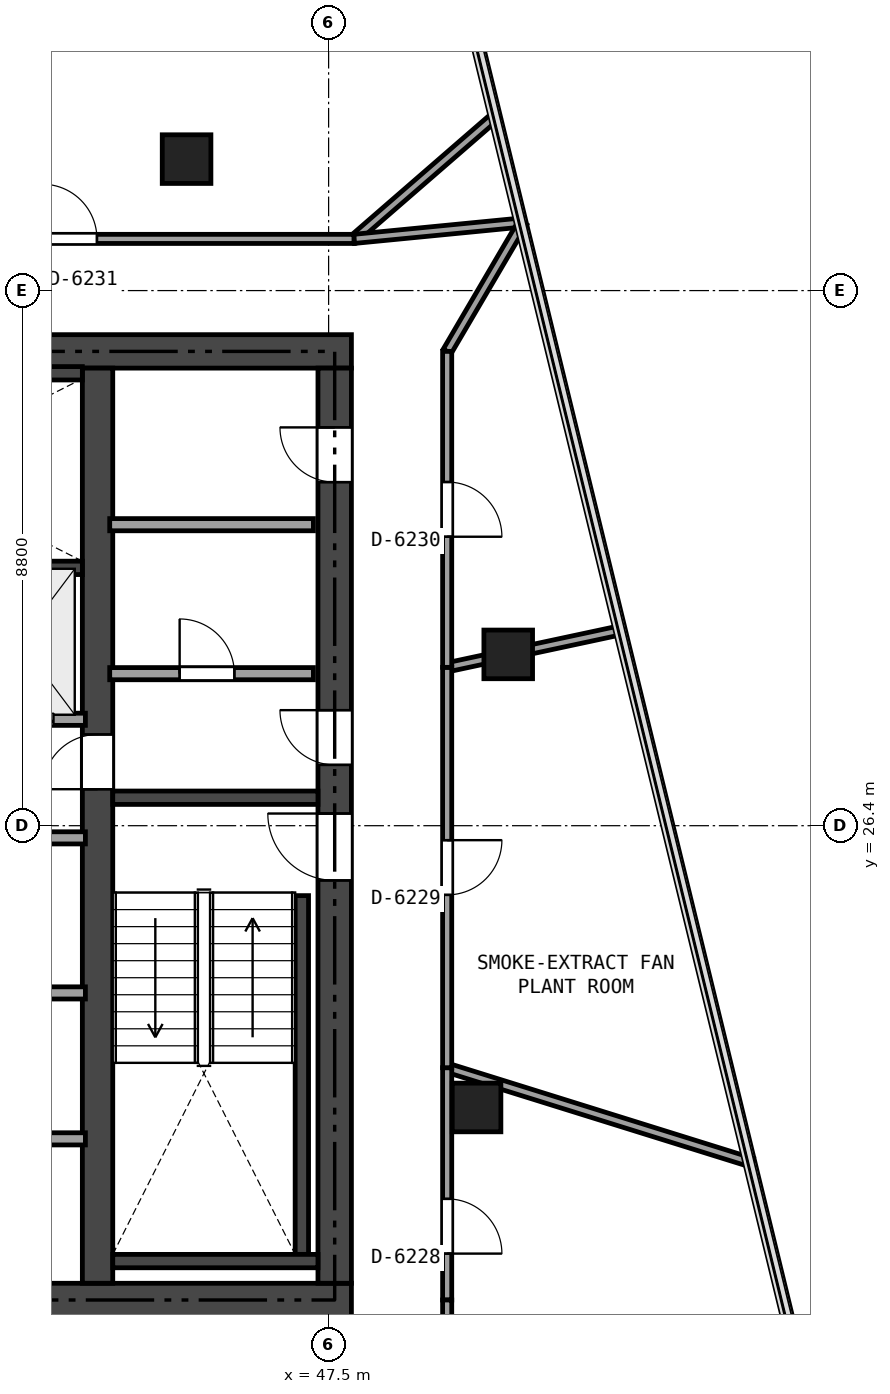
"""IFC4 building model, lengths in metres.
Left out: names, types, materials, properties, quantities, classifications, styles, units other than length and angle.
Written with IfcOpenShell. Run it as: python <this file> out.ifc"""

import sys

from ifc_helpers import new_model, si_unit, direction, frame, frame_2d, origin, origin_2d, place, context, subcontext, project, spatial, rectangle, extrude, element, fill, save


model = new_model("IFC4")
c1 = context("Model", 3, precision=1e-05, world=origin(), true_north=direction((0.0, 1.0)))
c2 = subcontext(c1, "Body", "Model", "MODEL_VIEW")
j1 = project(units=[si_unit("LENGTHUNIT", "METRE"), si_unit("PLANEANGLEUNIT", "RADIAN")], contexts=[c1])
p1 = place(None, origin())
s1 = spatial("IfcSite", under=j1, at=p1, CompositionType="ELEMENT")
p2 = place(p1, origin())
s2 = spatial("IfcBuilding", under=s1, at=p2, CompositionType="ELEMENT")
p3 = place(p2, frame((0.0, 0.0, 231.9)))
s3 = spatial("IfcBuildingStorey", under=s2, at=p3, CompositionType="ELEMENT", Elevation=231.9)
p4 = place(p3, frame((26.525, 18.6, 0.0), z_axis=(0.0, 0.0, 1.0), x_axis=(1.0, 0.0, 0.0)))
e1 = element("IfcWall", 1, at=p4, inside=s3, PredefinedType="SHEAR", context=c2, shape_type="SweptSolid", body=[
    extrude(rectangle(XDim=21.35, YDim=0.55, at=frame_2d((10.675, 0.0))), origin(), (0.0, 0.0, 1.0), 3.18),
])
p5 = place(p4, frame((12.4, 0.0, 0.0)))
e2 = element("IfcOpeningElement", 2, at=p5, cuts=e1, PredefinedType="OPENING", context=c2, shape_type="SweptSolid", body=[
    extrude(rectangle(XDim=1.15, YDim=2.15, at=frame_2d((0.575, 1.075))), frame((0.0, 0.285, 0.0), z_axis=(0.0, -1.0, 0.0), x_axis=(1.0, 0.0, 0.0)), (0.0, 0.0, 1.0), 0.57),
])
p6 = place(p4, frame((5.225, 0.0, 0.0)))
e3 = element("IfcOpeningElement", 3, at=p6, cuts=e1, PredefinedType="OPENING", context=c2, shape_type="SweptSolid", body=[
    extrude(rectangle(XDim=0.9, YDim=2.1, at=frame_2d((0.45, 1.05))), frame((0.0, 0.285, 0.0), z_axis=(0.0, -1.0, 0.0), x_axis=(1.0, 0.0, 0.0)), (0.0, 0.0, 1.0), 0.57),
])
p7 = place(p3, frame((26.525, 34.2, 0.0), z_axis=(0.0, 0.0, 1.0), x_axis=(1.0, 0.0, 0.0)))
e4 = element("IfcWall", 4, at=p7, inside=s3, PredefinedType="SHEAR", context=c2, shape_type="SweptSolid", body=[
    extrude(rectangle(XDim=21.35, YDim=0.55, at=frame_2d((10.675, 0.0))), origin(), (0.0, 0.0, 1.0), 3.18),
])
p8 = place(p7, frame((9.675, 0.0, 0.0)))
e5 = element("IfcOpeningElement", 5, at=p8, cuts=e4, PredefinedType="OPENING", context=c2, shape_type="SweptSolid", body=[
    extrude(rectangle(XDim=1.1, YDim=2.15, at=frame_2d((0.55, 1.075))), frame((0.0, 0.285, 0.0), z_axis=(0.0, -1.0, 0.0), x_axis=(1.0, 0.0, 0.0)), (0.0, 0.0, 1.0), 0.57),
])
p9 = place(p7, frame((1.925, 0.0, 0.0)))
e6 = element("IfcOpeningElement", 6, at=p9, cuts=e4, PredefinedType="OPENING", context=c2, shape_type="SweptSolid", body=[
    extrude(rectangle(XDim=0.9, YDim=2.1, at=frame_2d((0.45, 1.05))), frame((0.0, 0.285, 0.0), z_axis=(0.0, -1.0, 0.0), x_axis=(1.0, 0.0, 0.0)), (0.0, 0.0, 1.0), 0.57),
])
p10 = place(p7, frame((6.225, 0.0, 0.0)))
e7 = element("IfcOpeningElement", 7, at=p10, cuts=e4, PredefinedType="OPENING", context=c2, shape_type="SweptSolid", body=[
    extrude(rectangle(XDim=0.9, YDim=2.1, at=frame_2d((0.45, 1.05))), frame((0.0, 0.285, 0.0), z_axis=(0.0, -1.0, 0.0), x_axis=(1.0, 0.0, 0.0)), (0.0, 0.0, 1.0), 0.57),
])
p11 = place(p3, frame((47.6, 18.875, 0.0), z_axis=(0.0, 0.0, 1.0), x_axis=(0.0, 1.0, 0.0)))
e8 = element("IfcWall", 8, at=p11, inside=s3, PredefinedType="SHEAR", context=c2, shape_type="SweptSolid", body=[
    extrude(rectangle(XDim=15.05, YDim=0.55, at=frame_2d((7.525, 0.0))), origin(), (0.0, 0.0, 1.0), 3.18),
])
p12 = place(p11, frame((6.625, 0.0, 0.0)))
e9 = element("IfcOpeningElement", 9, at=p12, cuts=e8, PredefinedType="OPENING", context=c2, shape_type="SweptSolid", body=[
    extrude(rectangle(XDim=1.1, YDim=2.15, at=frame_2d((0.55, 1.075))), frame((0.0, 0.285, 0.0), z_axis=(0.0, -1.0, 0.0), x_axis=(1.0, 0.0, 0.0)), (0.0, 0.0, 1.0), 0.57),
])
p13 = place(p11, frame((8.525, 0.0, 0.0)))
e10 = element("IfcOpeningElement", 10, at=p13, cuts=e8, PredefinedType="OPENING", context=c2, shape_type="SweptSolid", body=[
    extrude(rectangle(XDim=0.9, YDim=2.1, at=frame_2d((0.45, 1.05))), frame((0.0, 0.285, 0.0), z_axis=(0.0, -1.0, 0.0), x_axis=(1.0, 0.0, 0.0)), (0.0, 0.0, 1.0), 0.57),
])
p14 = place(p11, frame((13.175, 0.0, 0.0)))
e11 = element("IfcOpeningElement", 11, at=p14, cuts=e8, PredefinedType="OPENING", context=c2, shape_type="SweptSolid", body=[
    extrude(rectangle(XDim=0.9, YDim=2.1, at=frame_2d((0.45, 1.05))), frame((0.0, 0.285, 0.0), z_axis=(0.0, -1.0, 0.0), x_axis=(1.0, 0.0, 0.0)), (0.0, 0.0, 1.0), 0.57),
])
p15 = place(p3, frame((43.7, 18.875, 0.0), z_axis=(0.0, 0.0, 1.0), x_axis=(0.0, 1.0, 0.0)))
e12 = element("IfcWall", 12, at=p15, inside=s3, PredefinedType="SHEAR", context=c2, shape_type="SweptSolid", body=[
    extrude(rectangle(XDim=15.05, YDim=0.5, at=frame_2d((7.525, 0.0))), origin(), (0.0, 0.0, 1.0), 3.18),
])
p16 = place(p15, frame((8.125, 0.0, 0.0)))
e13 = element("IfcOpeningElement", 13, at=p16, cuts=e12, PredefinedType="OPENING", context=c2, shape_type="SweptSolid", body=[
    extrude(rectangle(XDim=0.9, YDim=2.1, at=frame_2d((0.45, 1.05))), frame((0.0, 0.26, 0.0), z_axis=(0.0, -1.0, 0.0), x_axis=(1.0, 0.0, 0.0)), (0.0, 0.0, 1.0), 0.52),
])
p17 = place(p3, frame((43.95, 26.86, 0.0), z_axis=(0.0, 0.0, 1.0), x_axis=(1.0, 0.0, 0.0)))
e14 = element("IfcWall", 14, at=p17, inside=s3, PredefinedType="SHEAR", context=c2, shape_type="SweptSolid", body=[
    extrude(rectangle(XDim=3.375, YDim=0.22, at=frame_2d((1.688, 0.0))), origin(), (0.0, 0.0, 1.0), 3.18),
])
p18 = place(p3, frame((47.06, 19.35, 0.0), z_axis=(0.0, 0.0, 1.0), x_axis=(0.0, 1.0, 0.0)))
e15 = element("IfcWall", 15, at=p18, inside=s3, PredefinedType="SHEAR", context=c2, shape_type="SweptSolid", body=[
    extrude(rectangle(XDim=5.9, YDim=0.22, at=frame_2d((2.95, 0.0))), origin(), (0.0, 0.0, 1.0), 3.18),
])
p19 = place(p3, frame((43.95, 19.24, 0.0), z_axis=(0.0, 0.0, 1.0), x_axis=(1.0, 0.0, 0.0)))
e16 = element("IfcWall", 16, at=p19, inside=s3, PredefinedType="SHEAR", context=c2, shape_type="SweptSolid", body=[
    extrude(rectangle(XDim=3.375, YDim=0.22, at=frame_2d((1.688, 0.0))), origin(), (0.0, 0.0, 1.0), 3.18),
])
p20 = place(p3, frame((35.84, 30.64, 0.0), z_axis=(0.0, 0.0, 1.0), x_axis=(1.0, 0.0, 0.0)))
e17 = element("IfcWall", 17, at=p20, inside=s3, PredefinedType="SHEAR", context=c2, shape_type="SweptSolid", body=[
    extrude(rectangle(XDim=7.61, YDim=0.22, at=frame_2d((3.805, 0.0))), origin(), (0.0, 0.0, 1.0), 3.18),
])
p21 = place(p3, frame((37.55, 33.84, 0.0), z_axis=(0.0, 0.0, 1.0), x_axis=(1.0, 0.0, 0.0)))
e18 = element("IfcWall", 18, at=p21, inside=s3, PredefinedType="SHEAR", context=c2, shape_type="SweptSolid", body=[
    extrude(rectangle(XDim=5.9, YDim=0.22, at=frame_2d((2.95, 0.0))), origin(), (0.0, 0.0, 1.0), 3.18),
])
for number, where, z_axis, x_axis in (
    (19, (50.454, 29.217, 0.0), (0.0, 0.0, 1.0), (1.0, 0.0, 0.0)),
    (20, (45.164, 37.362, 0.0), (0.0, 0.0, 1.0), (1.0, 0.0, 0.0)),
    (21, (49.933, 21.766, 0.0), (0.0, 0.0, 1.0), (1.0, 0.0, 0.0)),
):
    element("IfcColumn", number, at=place(p3, frame(where, z_axis=z_axis, x_axis=x_axis)), inside=s3, PredefinedType="COLUMN", context=c2, shape_type="SweptSolid", body=[
        extrude(rectangle(XDim=0.8, YDim=0.8, at=origin_2d()), origin(), (0.0, 0.0, 1.0), 3.18),
    ])
p22 = place(p3, frame((43.9, 28.9, 0.0), z_axis=(0.0, 0.0, 1.0), x_axis=(1.0, 0.0, 0.0)))
e22 = element("IfcWall", 22, at=p22, inside=s3, PredefinedType="SOLIDWALL", context=c2, shape_type="SweptSolid", body=[
    extrude(rectangle(XDim=3.35, YDim=0.2, at=frame_2d((1.675, 0.0))), origin(), (0.0, 0.0, 1.0), 3.18),
])
p23 = place(p22, frame((1.15, 0.0, 0.0)))
e23 = element("IfcOpeningElement", 23, at=p23, cuts=e22, PredefinedType="OPENING", context=c2, shape_type="SweptSolid", body=[
    extrude(rectangle(XDim=0.9, YDim=2.1, at=frame_2d((0.45, 1.05))), frame((0.0, 0.11, 0.0), z_axis=(0.0, -1.0, 0.0), x_axis=(1.0, 0.0, 0.0)), (0.0, 0.0, 1.0), 0.22),
])
p24 = place(p3, frame((43.9, 31.35, 0.0), z_axis=(0.0, 0.0, 1.0), x_axis=(1.0, 0.0, 0.0)))
e24 = element("IfcWall", 24, at=p24, inside=s3, PredefinedType="SOLIDWALL", context=c2, shape_type="SweptSolid", body=[
    extrude(rectangle(XDim=3.35, YDim=0.2, at=frame_2d((1.675, 0.0))), origin(), (0.0, 0.0, 1.0), 2.809),
])
p25 = place(p3, frame((35.62, 28.15, 0.0), z_axis=(0.0, 0.0, 1.0), x_axis=(1.0, 0.0, 0.0)))
e25 = element("IfcWall", 25, at=p25, inside=s3, PredefinedType="SOLIDWALL", context=c2, shape_type="SweptSolid", body=[
    extrude(rectangle(XDim=7.88, YDim=0.2, at=frame_2d((3.94, 0.0))), origin(), (0.0, 0.0, 1.0), 3.18),
])
p26 = place(p25, frame((0.405, 0.0, 0.0)))
e26 = element("IfcOpeningElement", 26, at=p26, cuts=e25, PredefinedType="OPENING", context=c2, shape_type="SweptSolid", body=[
    extrude(rectangle(XDim=1.1, YDim=2.15, at=frame_2d((0.55, 1.075))), frame((0.0, 0.11, 0.0), z_axis=(0.0, -1.0, 0.0), x_axis=(1.0, 0.0, 0.0)), (0.0, 0.0, 1.0), 0.22),
])
p27 = place(p25, frame((2.355, 0.0, 0.0)))
e27 = element("IfcOpeningElement", 27, at=p27, cuts=e25, PredefinedType="OPENING", context=c2, shape_type="SweptSolid", body=[
    extrude(rectangle(XDim=1.1, YDim=2.15, at=frame_2d((0.55, 1.075))), frame((0.0, 0.11, 0.0), z_axis=(0.0, -1.0, 0.0), x_axis=(1.0, 0.0, 0.0)), (0.0, 0.0, 1.0), 0.22),
])
p28 = place(p25, frame((4.305, 0.0, 0.0)))
e28 = element("IfcOpeningElement", 28, at=p28, cuts=e25, PredefinedType="OPENING", context=c2, shape_type="SweptSolid", body=[
    extrude(rectangle(XDim=1.1, YDim=2.15, at=frame_2d((0.55, 1.075))), frame((0.0, 0.11, 0.0), z_axis=(0.0, -1.0, 0.0), x_axis=(1.0, 0.0, 0.0)), (0.0, 0.0, 1.0), 0.22),
])
p29 = place(p25, frame((6.255, 0.0, 0.0)))
e29 = element("IfcOpeningElement", 29, at=p29, cuts=e25, PredefinedType="OPENING", context=c2, shape_type="SweptSolid", body=[
    extrude(rectangle(XDim=1.1, YDim=2.15, at=frame_2d((0.55, 1.075))), frame((0.0, 0.11, 0.0), z_axis=(0.0, -1.0, 0.0), x_axis=(1.0, 0.0, 0.0)), (0.0, 0.0, 1.0), 0.22),
])
p30 = place(p3, frame((35.62, 26.2, 0.0), z_axis=(0.0, 0.0, 1.0), x_axis=(1.0, 0.0, 0.0)))
e30 = element("IfcWall", 30, at=p30, inside=s3, PredefinedType="SOLIDWALL", context=c2, shape_type="SweptSolid", body=[
    extrude(rectangle(XDim=7.88, YDim=0.2, at=frame_2d((3.94, 0.0))), origin(), (0.0, 0.0, 1.0), 3.18),
])
p31 = place(p30, frame((1.13, 0.0, 0.0)))
e31 = element("IfcOpeningElement", 31, at=p31, cuts=e30, PredefinedType="OPENING", context=c2, shape_type="SweptSolid", body=[
    extrude(rectangle(XDim=0.9, YDim=2.1, at=frame_2d((0.45, 1.05))), frame((0.0, 0.11, 0.0), z_axis=(0.0, -1.0, 0.0), x_axis=(1.0, 0.0, 0.0)), (0.0, 0.0, 1.0), 0.22),
])
p32 = place(p30, frame((5.73, 0.0, 0.0)))
e32 = element("IfcOpeningElement", 32, at=p32, cuts=e30, PredefinedType="OPENING", context=c2, shape_type="SweptSolid", body=[
    extrude(rectangle(XDim=0.9, YDim=2.1, at=frame_2d((0.45, 1.05))), frame((0.0, 0.11, 0.0), z_axis=(0.0, -1.0, 0.0), x_axis=(1.0, 0.0, 0.0)), (0.0, 0.0, 1.0), 0.22),
])
p33 = place(p3, frame((35.62, 23.65, 0.0), z_axis=(0.0, 0.0, 1.0), x_axis=(1.0, 0.0, 0.0)))
e33 = element("IfcWall", 33, at=p33, inside=s3, PredefinedType="SOLIDWALL", context=c2, shape_type="SweptSolid", body=[
    extrude(rectangle(XDim=7.88, YDim=0.2, at=frame_2d((3.94, 0.0))), origin(), (0.0, 0.0, 1.0), 2.701),
])
p34 = place(p3, frame((35.62, 21.25, 0.0), z_axis=(0.0, 0.0, 1.0), x_axis=(1.0, 0.0, 0.0)))
e34 = element("IfcWall", 34, at=p34, inside=s3, PredefinedType="SOLIDWALL", context=c2, shape_type="SweptSolid", body=[
    extrude(rectangle(XDim=7.88, YDim=0.2, at=frame_2d((3.94, 0.0))), origin(), (0.0, 0.0, 1.0), 3.18),
])
p35 = place(p34, frame((1.13, 0.0, 0.0)))
e35 = element("IfcOpeningElement", 35, at=p35, cuts=e34, PredefinedType="OPENING", context=c2, shape_type="SweptSolid", body=[
    extrude(rectangle(XDim=0.9, YDim=2.1, at=frame_2d((0.45, 1.05))), frame((0.0, 0.11, 0.0), z_axis=(0.0, -1.0, 0.0), x_axis=(1.0, 0.0, 0.0)), (0.0, 0.0, 1.0), 0.22),
])
p36 = place(p34, frame((5.73, 0.0, 0.0)))
e36 = element("IfcOpeningElement", 36, at=p36, cuts=e34, PredefinedType="OPENING", context=c2, shape_type="SweptSolid", body=[
    extrude(rectangle(XDim=0.9, YDim=2.1, at=frame_2d((0.45, 1.05))), frame((0.0, 0.11, 0.0), z_axis=(0.0, -1.0, 0.0), x_axis=(1.0, 0.0, 0.0)), (0.0, 0.0, 1.0), 0.22),
])
p37 = place(p3, frame((40.335, 36.05, 0.0), z_axis=(0.0, 0.0, 1.0), x_axis=(0.308777401337, 0.951134331429, 0.0)))
e37 = element("IfcWall", 37, at=p37, inside=s3, PredefinedType="PARTITIONING", context=c2, shape_type="SweptSolid", body=[
    extrude(rectangle(XDim=10.749, YDim=0.15, at=frame_2d((5.375, 0.0))), origin(), (0.0, 0.0, 1.0), 2.701),
])
p38 = place(p3, frame((54.464, 20.857, 0.0), z_axis=(0.0, 0.0, 1.0), x_axis=(-0.954693131117, 0.297592045253, 0.0)))
e38 = element("IfcWall", 38, at=p38, inside=s3, PredefinedType="PARTITIONING", context=c2, shape_type="SweptSolid", body=[
    extrude(rectangle(XDim=5.252, YDim=0.15, at=frame_2d((2.626, 0.0))), origin(), (0.0, 0.0, 1.0), 2.705),
])
p39 = place(p3, frame((49.45, 22.42, 0.0), z_axis=(0.0, 0.0, 1.0), x_axis=(0.0, -1.0, 0.0)))
e39 = element("IfcWall", 39, at=p39, inside=s3, PredefinedType="PARTITIONING", context=c2, shape_type="SweptSolid", body=[
    extrude(rectangle(XDim=3.82, YDim=0.15, at=frame_2d((1.91, 0.0))), origin(), (0.0, 0.0, 1.0), 2.625),
])
p40 = place(p39, frame((2.157, 0.0, 0.0)))
e40 = element("IfcOpeningElement", 40, at=p40, cuts=e39, PredefinedType="OPENING", context=c2, shape_type="SweptSolid", body=[
    extrude(rectangle(XDim=0.9, YDim=2.0, at=frame_2d((0.45, 1.0))), frame((0.0, 0.085, 0.0), z_axis=(0.0, -1.0, 0.0), x_axis=(1.0, 0.0, 0.0)), (0.0, 0.0, 1.0), 0.17),
])
p41 = place(p3, frame((49.45, 18.6, 0.0), z_axis=(0.0, 0.0, 1.0), x_axis=(0.0, -1.0, 0.0)))
e41 = element("IfcWall", 41, at=p41, inside=s3, PredefinedType="PARTITIONING", context=c2, shape_type="SweptSolid", body=[
    extrude(rectangle(XDim=1.85, YDim=0.15, at=frame_2d((0.925, 0.0))), origin(), (0.0, 0.0, 1.0), 3.18),
])
p42 = place(p3, frame((52.319, 29.618, 0.0), z_axis=(0.0, 0.0, 1.0), x_axis=(-0.977858392213, -0.209267686897, 0.0)))
e42 = element("IfcWall", 42, at=p42, inside=s3, PredefinedType="PARTITIONING", context=c2, shape_type="SweptSolid", body=[
    extrude(rectangle(XDim=2.934, YDim=0.15, at=frame_2d((1.467, 0.0))), origin(), (0.0, 0.0, 1.0), 2.625),
])
p43 = place(p3, frame((49.45, 29.004, 0.0), z_axis=(0.0, 0.0, 1.0), x_axis=(0.0, -1.0, 0.0)))
e43 = element("IfcWall", 43, at=p43, inside=s3, PredefinedType="PARTITIONING", context=c2, shape_type="SweptSolid", body=[
    extrude(rectangle(XDim=6.584, YDim=0.15, at=frame_2d((3.292, 0.0))), origin(), (0.0, 0.0, 1.0), 2.625),
])
p44 = place(p43, frame((2.842, 0.0, 0.0)))
e44 = element("IfcOpeningElement", 44, at=p44, cuts=e43, PredefinedType="OPENING", context=c2, shape_type="SweptSolid", body=[
    extrude(rectangle(XDim=0.9, YDim=2.0, at=frame_2d((0.45, 1.0))), frame((0.0, 0.085, 0.0), z_axis=(0.0, -1.0, 0.0), x_axis=(1.0, 0.0, 0.0)), (0.0, 0.0, 1.0), 0.17),
])
p45 = place(p3, frame((50.267, 38.089, 0.0), z_axis=(0.0, 0.0, 1.0), x_axis=(-0.75532132491, -0.655354633871, 0.0)))
e45 = element("IfcWall", 45, at=p45, inside=s3, PredefinedType="PARTITIONING", context=c2, shape_type="SweptSolid", body=[
    extrude(rectangle(XDim=3.111, YDim=0.15, at=frame_2d((1.556, 0.0))), origin(), (0.0, 0.0, 1.0), 3.18),
])
p46 = place(p3, frame((47.917, 36.05, 0.0), z_axis=(0.0, 0.0, 1.0), x_axis=(0.995272571321, 0.097121103663, 0.0)))
e46 = element("IfcWall", 46, at=p46, inside=s3, PredefinedType="PARTITIONING", context=c2, shape_type="SweptSolid", body=[
    extrude(rectangle(XDim=2.79, YDim=0.15, at=frame_2d((1.395, 0.0))), origin(), (0.0, 0.0, 1.0), 3.18),
])
p47 = place(p3, frame((50.694, 36.321, 0.0), z_axis=(0.0, 0.0, 1.0), x_axis=(-0.505943702969, -0.862566501451, 0.0)))
e47 = element("IfcWall", 47, at=p47, inside=s3, PredefinedType="PARTITIONING", context=c2, shape_type="SweptSolid", body=[
    extrude(rectangle(XDim=2.459, YDim=0.15, at=frame_2d((1.229, 0.0))), origin(), (0.0, 0.0, 1.0), 3.18),
])
p48 = place(p3, frame((49.45, 34.2, 0.0), z_axis=(0.0, 0.0, 1.0), x_axis=(0.0, -1.0, 0.0)))
e48 = element("IfcWall", 48, at=p48, inside=s3, PredefinedType="PARTITIONING", context=c2, shape_type="SweptSolid", body=[
    extrude(rectangle(XDim=5.196, YDim=0.15, at=frame_2d((2.598, 0.0))), origin(), (0.0, 0.0, 1.0), 2.625),
])
p49 = place(p48, frame((2.148, 0.0, 0.0)))
e49 = element("IfcOpeningElement", 49, at=p49, cuts=e48, PredefinedType="OPENING", context=c2, shape_type="SweptSolid", body=[
    extrude(rectangle(XDim=0.9, YDim=2.0, at=frame_2d((0.45, 1.0))), frame((0.0, 0.085, 0.0), z_axis=(0.0, -1.0, 0.0), x_axis=(1.0, 0.0, 0.0)), (0.0, 0.0, 1.0), 0.17),
])
p50 = place(p3, frame((40.335, 36.05, 0.0), z_axis=(0.0, 0.0, 1.0), x_axis=(1.0, 0.0, 0.0)))
e50 = element("IfcWall", 50, at=p50, inside=s3, PredefinedType="PARTITIONING", context=c2, shape_type="SweptSolid", body=[
    extrude(rectangle(XDim=7.582, YDim=0.15, at=frame_2d((3.791, 0.0))), origin(), (0.0, 0.0, 1.0), 2.625),
])
p51 = place(p50, frame((2.455, 0.0, 0.0)))
e51 = element("IfcOpeningElement", 51, at=p51, cuts=e50, PredefinedType="OPENING", context=c2, shape_type="SweptSolid", body=[
    extrude(rectangle(XDim=0.9, YDim=2.0, at=frame_2d((0.45, 1.0))), frame((0.0, 0.085, 0.0), z_axis=(0.0, -1.0, 0.0), x_axis=(1.0, 0.0, 0.0)), (0.0, 0.0, 1.0), 0.17),
])
p52 = place(p12, origin())
e52 = element("IfcDoor", 52, at=p52, inside=s3, OperationType="SINGLE_SWING_RIGHT", PredefinedType="DOOR", context=c2, shape_type="SweptSolid", body=[
    extrude(rectangle(XDim=1.1, YDim=2.15, at=frame_2d((0.55, 1.075))), frame((0.0, 0.025, 0.0), z_axis=(0.0, -1.0, 0.0), x_axis=(1.0, 0.0, 0.0)), (0.0, 0.0, 1.0), 0.05),
])
fill(e9, e52)
p53 = place(p16, origin())
e53 = element("IfcDoor", 53, at=p53, inside=s3, OperationType="SINGLE_SWING_LEFT", PredefinedType="DOOR", context=c2, shape_type="SweptSolid", body=[
    extrude(rectangle(XDim=0.9, YDim=2.1, at=frame_2d((0.45, 1.05))), frame((0.0, 0.025, 0.0), z_axis=(0.0, -1.0, 0.0), x_axis=(1.0, 0.0, 0.0)), (0.0, 0.0, 1.0), 0.05),
])
fill(e13, e53)
p54 = place(p13, origin())
e54 = element("IfcDoor", 54, at=p54, inside=s3, OperationType="SINGLE_SWING_RIGHT", PredefinedType="DOOR", context=c2, shape_type="SweptSolid", body=[
    extrude(rectangle(XDim=0.9, YDim=2.1, at=frame_2d((0.45, 1.05))), frame((0.0, 0.025, 0.0), z_axis=(0.0, -1.0, 0.0), x_axis=(1.0, 0.0, 0.0)), (0.0, 0.0, 1.0), 0.05),
])
fill(e10, e54)
p55 = place(p23, origin())
e55 = element("IfcDoor", 55, at=p55, inside=s3, OperationType="SINGLE_SWING_LEFT", PredefinedType="DOOR", context=c2, shape_type="SweptSolid", body=[
    extrude(rectangle(XDim=0.9, YDim=2.1, at=frame_2d((0.45, 1.05))), frame((0.0, 0.025, 0.0), z_axis=(0.0, -1.0, 0.0), x_axis=(1.0, 0.0, 0.0)), (0.0, 0.0, 1.0), 0.05),
])
fill(e23, e55)
p56 = place(p14, origin())
e56 = element("IfcDoor", 56, at=p56, inside=s3, OperationType="SINGLE_SWING_RIGHT", PredefinedType="DOOR", context=c2, shape_type="SweptSolid", body=[
    extrude(rectangle(XDim=0.9, YDim=2.1, at=frame_2d((0.45, 1.05))), frame((0.0, 0.025, 0.0), z_axis=(0.0, -1.0, 0.0), x_axis=(1.0, 0.0, 0.0)), (0.0, 0.0, 1.0), 0.05),
])
fill(e11, e56)
p57 = place(p29, origin())
e57 = element("IfcDoor", 57, at=p57, inside=s3, OperationType="SLIDING_TO_LEFT", PredefinedType="DOOR", context=c2, shape_type="SweptSolid", body=[
    extrude(rectangle(XDim=1.1, YDim=2.15, at=frame_2d((0.55, 1.075))), frame((0.0, 0.025, 0.0), z_axis=(0.0, -1.0, 0.0), x_axis=(1.0, 0.0, 0.0)), (0.0, 0.0, 1.0), 0.05),
])
fill(e29, e57)
p58 = place(p40, origin())
e58 = element("IfcDoor", 58, at=p58, inside=s3, OperationType="SINGLE_SWING_RIGHT", PredefinedType="DOOR", context=c2, shape_type="SweptSolid", body=[
    extrude(rectangle(XDim=0.9, YDim=2.0, at=frame_2d((0.45, 1.0))), frame((0.0, 0.025, 0.0), z_axis=(0.0, -1.0, 0.0), x_axis=(1.0, 0.0, 0.0)), (0.0, 0.0, 1.0), 0.05),
])
fill(e40, e58)
p59 = place(p44, origin())
e59 = element("IfcDoor", 59, at=p59, inside=s3, OperationType="SINGLE_SWING_LEFT", PredefinedType="DOOR", context=c2, shape_type="SweptSolid", body=[
    extrude(rectangle(XDim=0.9, YDim=2.0, at=frame_2d((0.45, 1.0))), frame((0.0, 0.025, 0.0), z_axis=(0.0, -1.0, 0.0), x_axis=(1.0, 0.0, 0.0)), (0.0, 0.0, 1.0), 0.05),
])
fill(e44, e59)
p60 = place(p49, origin())
e60 = element("IfcDoor", 60, at=p60, inside=s3, OperationType="SINGLE_SWING_RIGHT", PredefinedType="DOOR", context=c2, shape_type="SweptSolid", body=[
    extrude(rectangle(XDim=0.9, YDim=2.0, at=frame_2d((0.45, 1.0))), frame((0.0, 0.025, 0.0), z_axis=(0.0, -1.0, 0.0), x_axis=(1.0, 0.0, 0.0)), (0.0, 0.0, 1.0), 0.05),
])
fill(e49, e60)
p61 = place(p51, origin())
e61 = element("IfcDoor", 61, at=p61, inside=s3, OperationType="SINGLE_SWING_LEFT", PredefinedType="DOOR", context=c2, shape_type="SweptSolid", body=[
    extrude(rectangle(XDim=0.9, YDim=2.0, at=frame_2d((0.45, 1.0))), frame((0.0, 0.025, 0.0), z_axis=(0.0, -1.0, 0.0), x_axis=(1.0, 0.0, 0.0)), (0.0, 0.0, 1.0), 0.05),
])
fill(e51, e61)
save(model, sys.argv[1])
